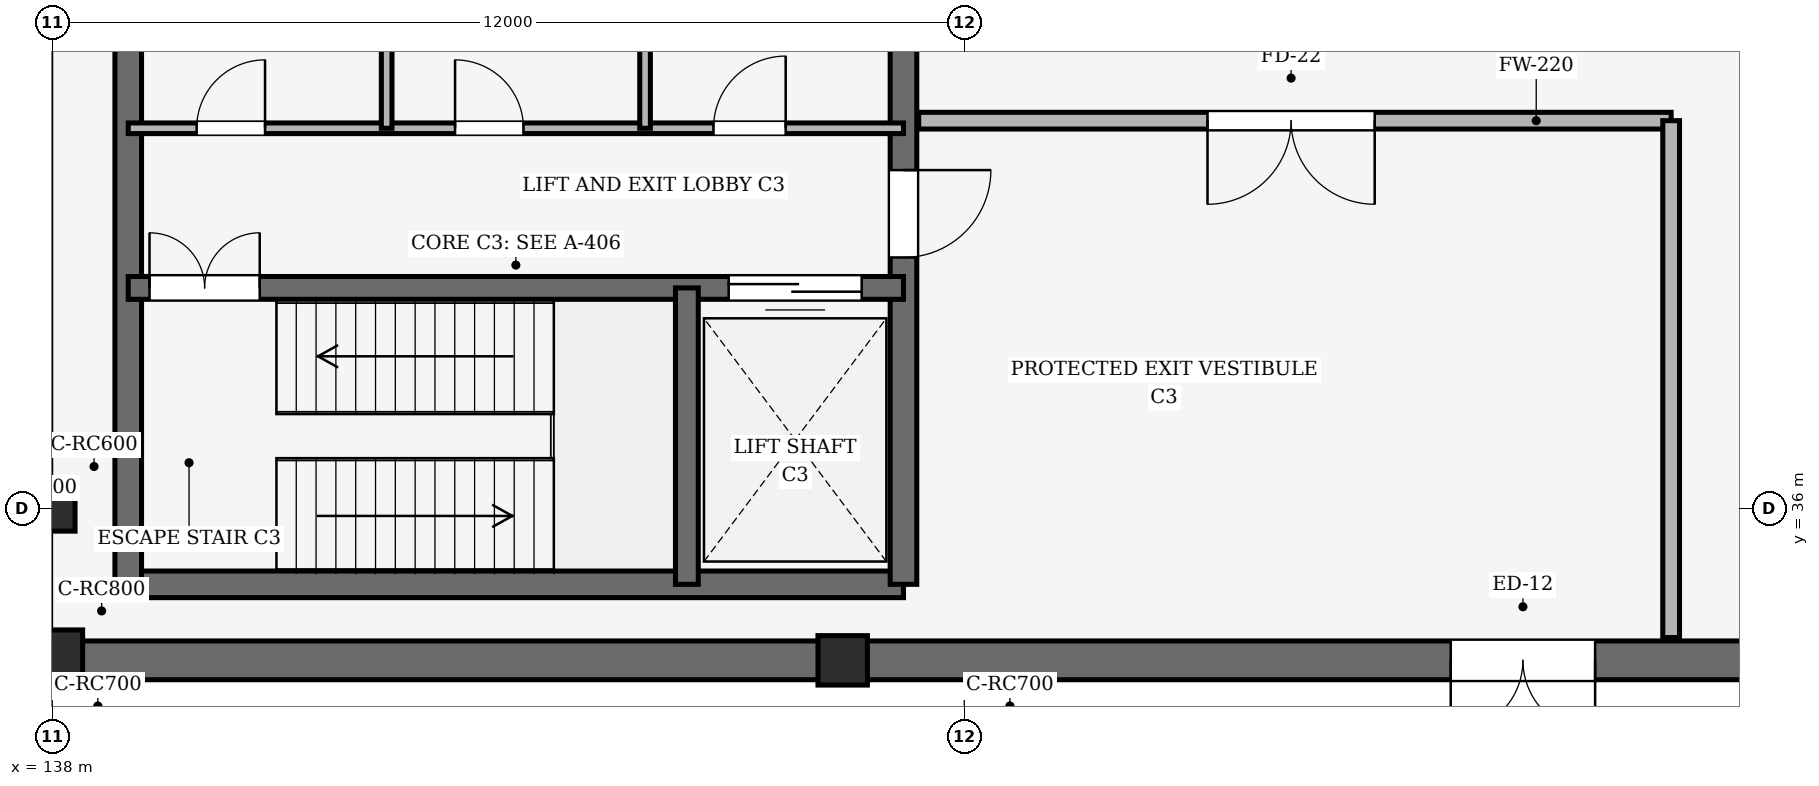
"""IFC4 building model, lengths in metres.
Left out: names, types, materials, properties, quantities, classifications, styles, units other than length and angle.
Written with IfcOpenShell. Run it as: python <this file> out.ifc"""

import sys

from ifc_helpers import new_model, si_unit, direction, frame, frame_2d, origin, origin_2d, place, context, subcontext, project, spatial, rectangle, extrude, element, fill, save


model = new_model("IFC4")
c1 = context("Model", 3, precision=1e-05, world=origin(), true_north=direction((0.0, 1.0)))
c2 = subcontext(c1, "Body", "Model", "MODEL_VIEW")
j1 = project(units=[si_unit("LENGTHUNIT", "METRE"), si_unit("PLANEANGLEUNIT", "RADIAN")], contexts=[c1])
p1 = place(None, origin())
s1 = spatial("IfcSite", under=j1, at=p1, CompositionType="ELEMENT")
p2 = place(p1, origin())
s2 = spatial("IfcBuilding", under=s1, at=p2, CompositionType="ELEMENT")
p3 = place(p2, origin())
s3 = spatial("IfcBuildingStorey", under=s2, at=p3, CompositionType="ELEMENT", Elevation=0.0)
p4 = place(p3, frame((138.0, 34.0, -0.44), z_axis=(0.0, 0.0, 1.0), x_axis=(1.0, 0.0, 0.0)))
e1 = element("IfcColumn", 1, at=p4, inside=s3, PredefinedType="COLUMN", context=c2, shape_type="SweptSolid", body=[
    extrude(rectangle(XDim=0.8, YDim=0.8, at=origin_2d()), origin(), (0.0, 0.0, 1.0), 5.84),
])
p5 = place(p3, frame((148.4, 34.0, -0.44), z_axis=(0.0, 0.0, 1.0), x_axis=(1.0, 0.0, 0.0)))
e2 = element("IfcColumn", 2, at=p5, inside=s3, PredefinedType="COLUMN", context=c2, shape_type="SweptSolid", body=[
    extrude(rectangle(XDim=0.65, YDim=0.65, at=origin_2d()), origin(), (0.0, 0.0, 1.0), 5.84),
])
p6 = place(p3, frame((138.0, 36.0, -0.44), z_axis=(0.0, 0.0, 1.0), x_axis=(1.0, 0.0, 0.0)))
e3 = element("IfcColumn", 3, at=p6, inside=s3, PredefinedType="COLUMN", context=c2, shape_type="SweptSolid", body=[
    extrude(rectangle(XDim=0.6, YDim=0.6, at=origin_2d()), origin(), (0.0, 0.0, 1.0), 5.84),
])
p7 = place(p3, frame((138.0, 34.0, 0.0), z_axis=(0.0, 0.0, 1.0), x_axis=(1.0, 0.0, 0.0)))
e4 = element("IfcWall", 4, at=p7, inside=s3, PredefinedType="SOLIDWALL", context=c2, shape_type="SweptSolid", body=[
    extrude(rectangle(XDim=10.4, YDim=0.51, at=frame_2d((5.2, 0.0))), origin(), (0.0, 0.0, 1.0), 4.95),
])
p8 = place(p3, frame((148.4, 34.0, 0.0), z_axis=(0.0, 0.0, 1.0), x_axis=(1.0, 0.0, 0.0)))
e5 = element("IfcWall", 5, at=p8, inside=s3, PredefinedType="SOLIDWALL", context=c2, shape_type="SweptSolid", body=[
    extrude(rectangle(XDim=35.2, YDim=0.51, at=frame_2d((17.6, 0.0))), origin(), (0.0, 0.0, 1.0), 4.95),
])
p9 = place(p8, frame((8.0, 0.0, 0.0)))
e6 = element("IfcOpeningElement", 6, at=p9, cuts=e5, PredefinedType="OPENING", context=c2, shape_type="SweptSolid", body=[
    extrude(rectangle(XDim=1.9, YDim=2.35, at=frame_2d((0.95, 1.175))), frame((0.0, 0.265, 0.0), z_axis=(0.0, -1.0, 0.0), x_axis=(1.0, 0.0, 0.0)), (0.0, 0.0, 1.0), 0.53),
])
p10 = place(p8, frame((18.4, 0.0, 0.0)))
e7 = element("IfcOpeningElement", 7, at=p10, cuts=e5, PredefinedType="OPENING", context=c2, shape_type="SweptSolid", body=[
    extrude(rectangle(XDim=2.4, YDim=2.65, at=frame_2d((1.2, 1.325))), frame((0.0, 0.265, 0.0), z_axis=(0.0, -1.0, 0.0), x_axis=(1.0, 0.0, 0.0)), (0.0, 0.0, 1.0), 0.53),
])
p11 = place(p3, frame((139.0, 35.0, 0.0), z_axis=(0.0, 0.0, 1.0), x_axis=(1.0, 0.0, 0.0)))
e8 = element("IfcWall", 8, at=p11, inside=s3, PredefinedType="SHEAR", context=c2, shape_type="SweptSolid", body=[
    extrude(rectangle(XDim=10.2, YDim=0.35, at=frame_2d((5.1, 0.0))), origin(), (0.0, 0.0, 1.0), 5.4),
])
p12 = place(p3, frame((139.0, 43.4, 0.0), z_axis=(0.0, 0.0, 1.0), x_axis=(0.0, -1.0, 0.0)))
e9 = element("IfcWall", 9, at=p12, inside=s3, PredefinedType="SHEAR", context=c2, shape_type="SweptSolid", body=[
    extrude(rectangle(XDim=8.4, YDim=0.35, at=frame_2d((4.2, 0.0))), origin(), (0.0, 0.0, 1.0), 5.4),
])
p13 = place(p3, frame((149.2, 35.0, 0.0), z_axis=(0.0, 0.0, 1.0), x_axis=(0.0, 1.0, 0.0)))
e10 = element("IfcWall", 10, at=p13, inside=s3, PredefinedType="SHEAR", context=c2, shape_type="SweptSolid", body=[
    extrude(rectangle(XDim=8.4, YDim=0.35, at=frame_2d((4.2, 0.0))), origin(), (0.0, 0.0, 1.0), 5.4),
])
p14 = place(p13, frame((4.3, 0.0, 0.0)))
e11 = element("IfcOpeningElement", 11, at=p14, cuts=e10, PredefinedType="OPENING", context=c2, shape_type="SweptSolid", body=[
    extrude(rectangle(XDim=1.15, YDim=2.15, at=frame_2d((0.575, 1.075))), frame((0.0, 0.185, 0.0), z_axis=(0.0, -1.0, 0.0), x_axis=(1.0, 0.0, 0.0)), (0.0, 0.0, 1.0), 0.37),
])
p15 = place(p3, frame((139.0, 38.9, 0.0), z_axis=(0.0, 0.0, 1.0), x_axis=(1.0, 0.0, 0.0)))
e12 = element("IfcWall", 12, at=p15, inside=s3, PredefinedType="SHEAR", context=c2, shape_type="SweptSolid", body=[
    extrude(rectangle(XDim=10.2, YDim=0.3, at=frame_2d((5.1, 0.0))), origin(), (0.0, 0.0, 1.0), 5.4),
])
p16 = place(p15, frame((0.28, 0.0, 0.0)))
e13 = element("IfcOpeningElement", 13, at=p16, cuts=e12, PredefinedType="OPENING", context=c2, shape_type="SweptSolid", body=[
    extrude(rectangle(XDim=1.45, YDim=2.15, at=frame_2d((0.725, 1.075))), frame((0.0, 0.16, 0.0), z_axis=(0.0, -1.0, 0.0), x_axis=(1.0, 0.0, 0.0)), (0.0, 0.0, 1.0), 0.32),
])
p17 = place(p15, frame((7.9, 0.0, 0.0)))
e14 = element("IfcOpeningElement", 14, at=p17, cuts=e12, PredefinedType="OPENING", context=c2, shape_type="SweptSolid", body=[
    extrude(rectangle(XDim=1.75, YDim=2.3, at=frame_2d((0.875, 1.15))), frame((0.0, 0.16, 0.0), z_axis=(0.0, -1.0, 0.0), x_axis=(1.0, 0.0, 0.0)), (0.0, 0.0, 1.0), 0.32),
])
p18 = place(p3, frame((146.35, 35.0, 0.0), z_axis=(0.0, 0.0, 1.0), x_axis=(0.0, 1.0, 0.0)))
e15 = element("IfcWall", 15, at=p18, inside=s3, PredefinedType="SHEAR", context=c2, shape_type="SweptSolid", body=[
    extrude(rectangle(XDim=3.9, YDim=0.3, at=frame_2d((1.95, 0.0))), origin(), (0.0, 0.0, 1.0), 5.4),
])
p19 = place(p3, frame((139.0, 41.0, 0.0), z_axis=(0.0, 0.0, 1.0), x_axis=(1.0, 0.0, 0.0)))
e16 = element("IfcWall", 16, at=p19, inside=s3, PredefinedType="PARTITIONING", context=c2, shape_type="SweptSolid", body=[
    extrude(rectangle(XDim=10.2, YDim=0.14, at=frame_2d((5.1, 0.0))), origin(), (0.0, 0.0, 1.0), 4.5),
])
p20 = place(p19, frame((0.9, 0.0, 0.0)))
e17 = element("IfcOpeningElement", 17, at=p20, cuts=e16, PredefinedType="OPENING", context=c2, shape_type="SweptSolid", body=[
    extrude(rectangle(XDim=0.9, YDim=2.1, at=frame_2d((0.45, 1.05))), frame((0.0, 0.08, 0.0), z_axis=(0.0, -1.0, 0.0), x_axis=(1.0, 0.0, 0.0)), (0.0, 0.0, 1.0), 0.16),
])
p21 = place(p19, frame((4.3, 0.0, 0.0)))
e18 = element("IfcOpeningElement", 18, at=p21, cuts=e16, PredefinedType="OPENING", context=c2, shape_type="SweptSolid", body=[
    extrude(rectangle(XDim=0.9, YDim=2.1, at=frame_2d((0.45, 1.05))), frame((0.0, 0.08, 0.0), z_axis=(0.0, -1.0, 0.0), x_axis=(1.0, 0.0, 0.0)), (0.0, 0.0, 1.0), 0.16),
])
p22 = place(p19, frame((7.7, 0.0, 0.0)))
e19 = element("IfcOpeningElement", 19, at=p22, cuts=e16, PredefinedType="OPENING", context=c2, shape_type="SweptSolid", body=[
    extrude(rectangle(XDim=0.95, YDim=2.1, at=frame_2d((0.475, 1.05))), frame((0.0, 0.08, 0.0), z_axis=(0.0, -1.0, 0.0), x_axis=(1.0, 0.0, 0.0)), (0.0, 0.0, 1.0), 0.16),
])
for number, where, z_axis, x_axis in (
    (20, (142.4, 41.0, 0.0), (0.0, 0.0, 1.0), (0.0, 1.0, 0.0)),
    (21, (145.8, 41.0, 0.0), (0.0, 0.0, 1.0), (0.0, 1.0, 0.0)),
):
    element("IfcWall", number, at=place(p3, frame(where, z_axis=z_axis, x_axis=x_axis)), inside=s3, PredefinedType="PARTITIONING", context=c2, shape_type="SweptSolid", body=[
        extrude(rectangle(XDim=2.4, YDim=0.14, at=frame_2d((1.2, 0.0))), origin(), (0.0, 0.0, 1.0), 4.5),
    ])
p23 = place(p3, frame((149.4, 41.1, 0.0), z_axis=(0.0, 0.0, 1.0), x_axis=(1.0, 0.0, 0.0)))
e22 = element("IfcWall", 22, at=p23, inside=s3, PredefinedType="SOLIDWALL", context=c2, shape_type="SweptSolid", body=[
    extrude(rectangle(XDim=9.9, YDim=0.22, at=frame_2d((4.95, 0.0))), origin(), (0.0, 0.0, 1.0), 4.9),
])
p24 = place(p23, frame((3.8, 0.0, 0.0)))
e23 = element("IfcOpeningElement", 23, at=p24, cuts=e22, PredefinedType="OPENING", context=c2, shape_type="SweptSolid", body=[
    extrude(rectangle(XDim=2.2, YDim=2.3, at=frame_2d((1.1, 1.15))), frame((0.0, 0.12, 0.0), z_axis=(0.0, -1.0, 0.0), x_axis=(1.0, 0.0, 0.0)), (0.0, 0.0, 1.0), 0.24),
])
p25 = place(p3, frame((159.3, 34.3, 0.0), z_axis=(0.0, 0.0, 1.0), x_axis=(0.0, 1.0, 0.0)))
e24 = element("IfcWall", 24, at=p25, inside=s3, PredefinedType="SOLIDWALL", context=c2, shape_type="SweptSolid", body=[
    extrude(rectangle(XDim=6.8, YDim=0.22, at=frame_2d((3.4, 0.0))), origin(), (0.0, 0.0, 1.0), 4.9),
])
p26 = place(p9, frame((1.9, 0.0, 0.0), z_axis=(0.0, 0.0, 1.0), x_axis=(-1.0, 0.0, 0.0)))
e25 = element("IfcDoor", 25, at=p26, inside=s3, OperationType="DOUBLE_DOOR_SINGLE_SWING", PredefinedType="DOOR", context=c2, shape_type="SweptSolid", body=[
    extrude(rectangle(XDim=1.9, YDim=2.35, at=frame_2d((0.95, 1.175))), frame((0.0, 0.025, 0.0), z_axis=(0.0, -1.0, 0.0), x_axis=(1.0, 0.0, 0.0)), (0.0, 0.0, 1.0), 0.05),
])
fill(e6, e25)
p27 = place(p14, frame((1.15, 0.0, 0.0), z_axis=(0.0, 0.0, 1.0), x_axis=(-1.0, 0.0, 0.0)))
e26 = element("IfcDoor", 26, at=p27, inside=s3, OperationType="SINGLE_SWING_LEFT", PredefinedType="DOOR", context=c2, shape_type="SweptSolid", body=[
    extrude(rectangle(XDim=1.15, YDim=2.15, at=frame_2d((0.575, 1.075))), frame((0.0, 0.025, 0.0), z_axis=(0.0, -1.0, 0.0), x_axis=(1.0, 0.0, 0.0)), (0.0, 0.0, 1.0), 0.05),
])
fill(e11, e26)
p28 = place(p16, origin())
e27 = element("IfcDoor", 27, at=p28, inside=s3, OperationType="DOUBLE_DOOR_SINGLE_SWING", PredefinedType="DOOR", context=c2, shape_type="SweptSolid", body=[
    extrude(rectangle(XDim=1.45, YDim=2.15, at=frame_2d((0.725, 1.075))), frame((0.0, 0.025, 0.0), z_axis=(0.0, -1.0, 0.0), x_axis=(1.0, 0.0, 0.0)), (0.0, 0.0, 1.0), 0.05),
])
fill(e13, e27)
p29 = place(p17, origin())
e28 = element("IfcDoor", 28, at=p29, inside=s3, OperationType="DOUBLE_DOOR_SLIDING", PredefinedType="DOOR", context=c2, shape_type="SweptSolid", body=[
    extrude(rectangle(XDim=1.75, YDim=2.3, at=frame_2d((0.875, 1.15))), frame((0.0, 0.025, 0.0), z_axis=(0.0, -1.0, 0.0), x_axis=(1.0, 0.0, 0.0)), (0.0, 0.0, 1.0), 0.05),
])
fill(e14, e28)
p30 = place(p20, origin())
e29 = element("IfcDoor", 29, at=p30, inside=s3, OperationType="SINGLE_SWING_RIGHT", PredefinedType="DOOR", context=c2, shape_type="SweptSolid", body=[
    extrude(rectangle(XDim=0.9, YDim=2.1, at=frame_2d((0.45, 1.05))), frame((0.0, 0.025, 0.0), z_axis=(0.0, -1.0, 0.0), x_axis=(1.0, 0.0, 0.0)), (0.0, 0.0, 1.0), 0.05),
])
fill(e17, e29)
p31 = place(p21, origin())
e30 = element("IfcDoor", 30, at=p31, inside=s3, OperationType="SINGLE_SWING_LEFT", PredefinedType="DOOR", context=c2, shape_type="SweptSolid", body=[
    extrude(rectangle(XDim=0.9, YDim=2.1, at=frame_2d((0.45, 1.05))), frame((0.0, 0.025, 0.0), z_axis=(0.0, -1.0, 0.0), x_axis=(1.0, 0.0, 0.0)), (0.0, 0.0, 1.0), 0.05),
])
fill(e18, e30)
p32 = place(p22, origin())
e31 = element("IfcDoor", 31, at=p32, inside=s3, OperationType="SINGLE_SWING_RIGHT", PredefinedType="DOOR", context=c2, shape_type="SweptSolid", body=[
    extrude(rectangle(XDim=0.95, YDim=2.1, at=frame_2d((0.475, 1.05))), frame((0.0, 0.025, 0.0), z_axis=(0.0, -1.0, 0.0), x_axis=(1.0, 0.0, 0.0)), (0.0, 0.0, 1.0), 0.05),
])
fill(e19, e31)
p33 = place(p24, frame((2.2, 0.0, 0.0), z_axis=(0.0, 0.0, 1.0), x_axis=(-1.0, 0.0, 0.0)))
e32 = element("IfcDoor", 32, at=p33, inside=s3, OperationType="DOUBLE_DOOR_SINGLE_SWING", PredefinedType="DOOR", context=c2, shape_type="SweptSolid", body=[
    extrude(rectangle(XDim=2.2, YDim=2.3, at=frame_2d((1.1, 1.15))), frame((0.0, 0.025, 0.0), z_axis=(0.0, -1.0, 0.0), x_axis=(1.0, 0.0, 0.0)), (0.0, 0.0, 1.0), 0.05),
])
fill(e23, e32)
save(model, sys.argv[1])
